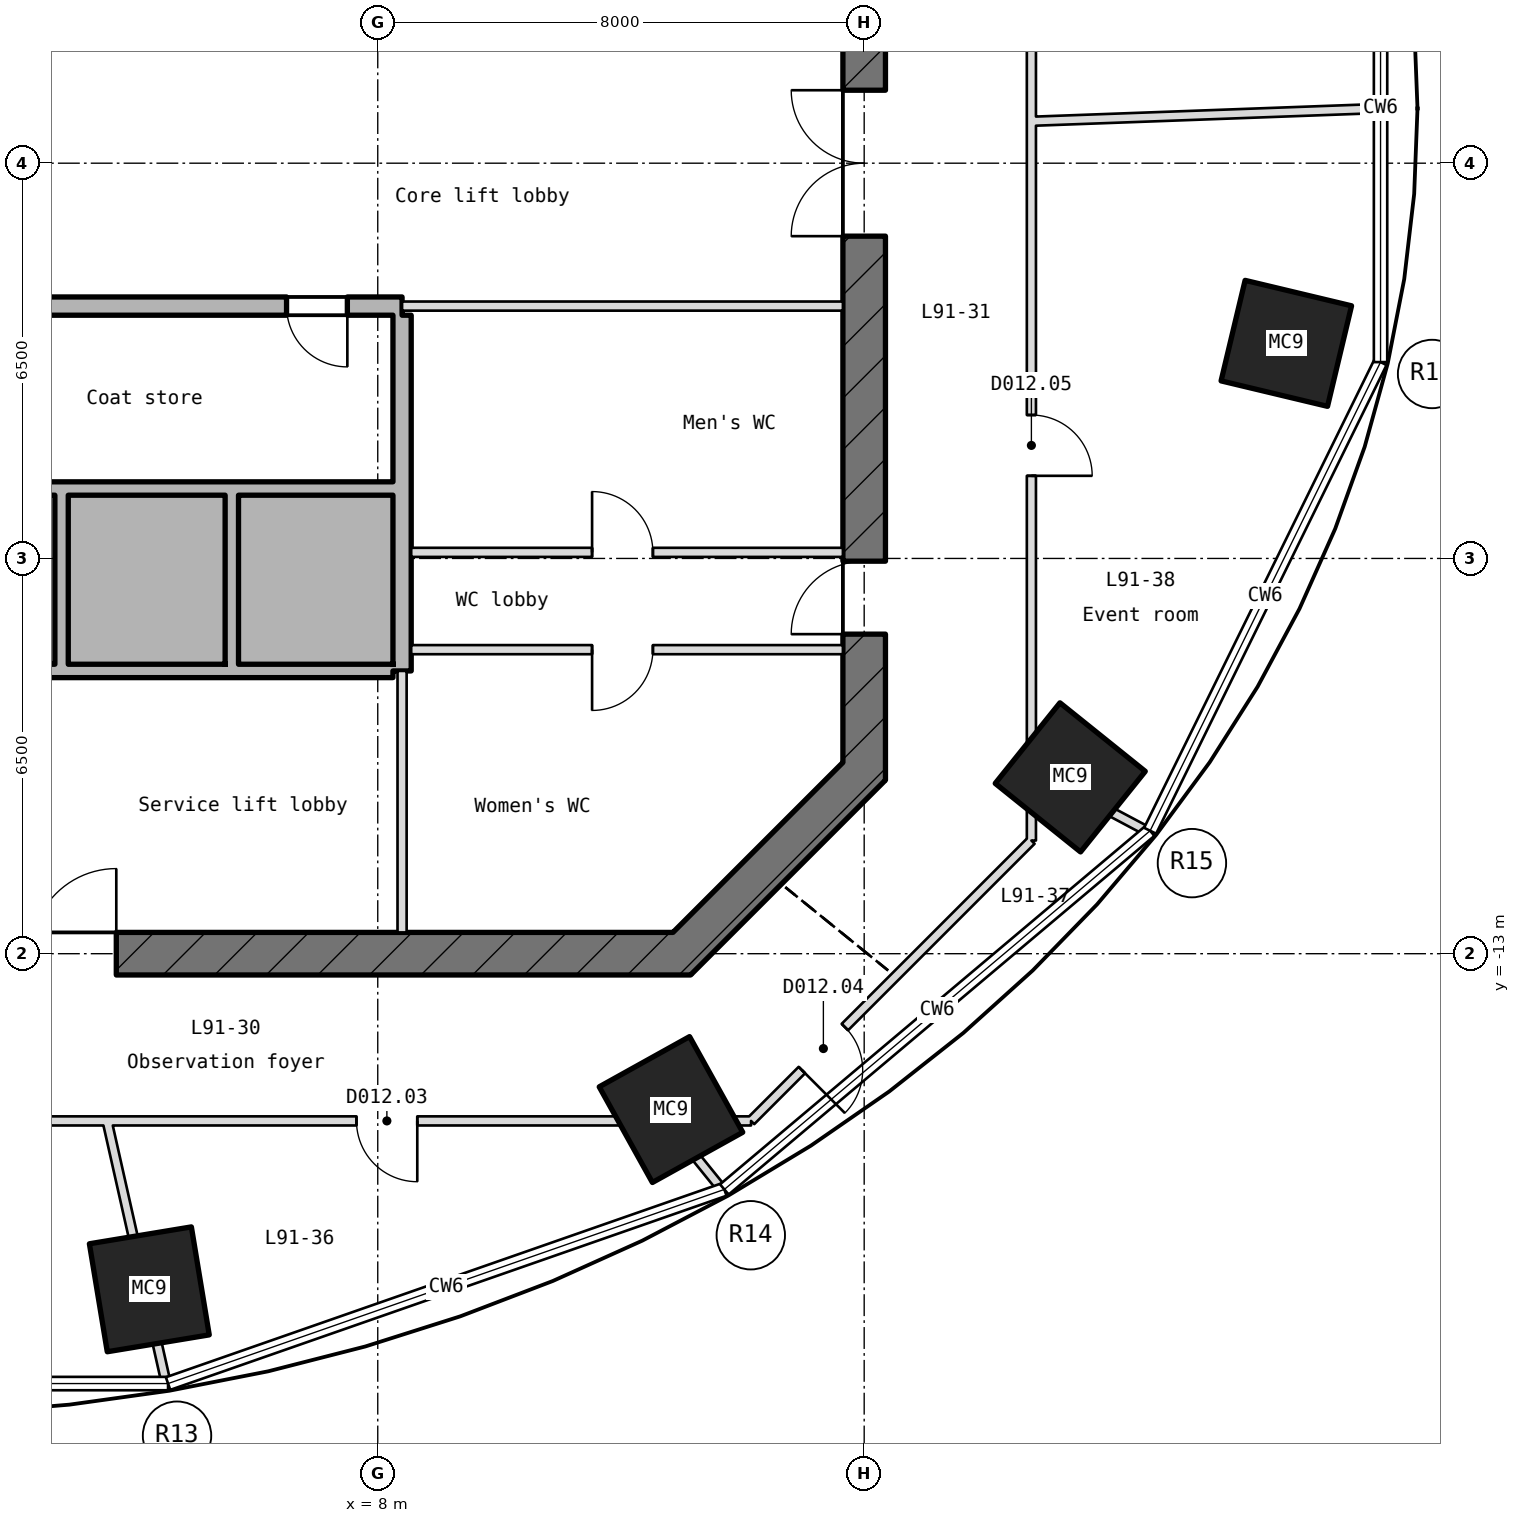
"""IFC4 building model, lengths in metres.
Left out: names, types, materials, properties, quantities, classifications, styles, units other than length and angle.
Written with IfcOpenShell. Run it as: python <this file> out.ifc"""

import sys

from ifc_helpers import new_model, si_unit, direction, frame, frame_2d, origin, origin_2d, place, context, subcontext, project, spatial, rectangle, hollow_rectangle, extrude, element, fill, save


model = new_model("IFC4")
c1 = context("Model", 3, precision=1e-05, world=origin(), true_north=direction((0.0, 1.0)))
c2 = subcontext(c1, "Body", "Model", "MODEL_VIEW")
j1 = project(units=[si_unit("LENGTHUNIT", "METRE"), si_unit("PLANEANGLEUNIT", "RADIAN")], contexts=[c1])
p1 = place(None, origin())
s1 = spatial("IfcSite", under=j1, at=p1, CompositionType="ELEMENT")
p2 = place(p1, origin())
s2 = spatial("IfcBuilding", under=s1, at=p2, CompositionType="ELEMENT")
p3 = place(p2, frame((0.0, 0.0, 401.95)))
s3 = spatial("IfcBuildingStorey", under=s2, at=p3, CompositionType="ELEMENT", Elevation=401.95)
for number, where, z_axis, x_axis in (
    (1, (4.243, -18.52, -0.25), (0.0, 0.0, 1.0), (-0.987, -0.163, 0.0)),
    (2, (12.823, -15.563, -0.25), (0.0, 0.0, 1.0), (-0.874, -0.486, 0.0)),
    (3, (19.389, -10.1, -0.25), (0.0, 0.0, 1.0), (-0.626, -0.78, 0.0)),
    (4, (22.943, -2.963, -0.25), (0.0, 0.0, 1.0), (-0.233, -0.973, 0.0)),
):
    element("IfcColumn", number, at=place(p3, frame(where, z_axis=z_axis, x_axis=x_axis)), inside=s3, PredefinedType="COLUMN", context=c2, shape_type="SweptSolid", body=[
        extrude(hollow_rectangle(XDim=1.7, YDim=1.8, WallThickness=0.05, at=origin_2d()), origin(), (0.0, 0.0, 1.0), 5.55),
    ])
p4 = place(p3, frame((12.897, -13.103, -0.25), z_axis=(0.0, 0.0, 1.0), x_axis=(0.707106781187, 0.707106781187, 0.0)))
e5 = element("IfcWall", 5, at=p4, inside=s3, PredefinedType="SHEAR", context=c2, shape_type="SweptSolid", body=[
    extrude(rectangle(XDim=4.533, YDim=0.7, at=frame_2d((2.266, 0.0))), origin(), (0.0, 0.0, 1.0), 5.55),
])
p5 = place(p3, frame((16.0, -10.145, -0.25), z_axis=(0.0, 0.0, 1.0), x_axis=(0.0, 1.0, 0.0)))
e6 = element("IfcWall", 6, at=p5, inside=s3, PredefinedType="SHEAR", context=c2, shape_type="SweptSolid", body=[
    extrude(rectangle(XDim=20.29, YDim=0.7, at=frame_2d((10.145, 0.0))), origin(), (0.0, 0.0, 1.0), 5.55),
])
p6 = place(p5, frame((8.945, 0.0, 0.25)))
e7 = element("IfcOpeningElement", 7, at=p6, cuts=e6, PredefinedType="OPENING", context=c2, shape_type="SweptSolid", body=[
    extrude(rectangle(XDim=2.4, YDim=2.1, at=frame_2d((1.2, 1.05))), frame((0.0, 0.36, 0.0), z_axis=(0.0, -1.0, 0.0), x_axis=(1.0, 0.0, 0.0)), (0.0, 0.0, 1.0), 0.72),
])
p7 = place(p5, frame((13.545, 0.0, 0.25)))
e8 = element("IfcOpeningElement", 8, at=p7, cuts=e6, PredefinedType="OPENING", context=c2, shape_type="SweptSolid", body=[
    extrude(rectangle(XDim=1.2, YDim=2.1, at=frame_2d((0.6, 1.05))), frame((0.0, 0.36, 0.0), z_axis=(0.0, -1.0, 0.0), x_axis=(1.0, 0.0, 0.0)), (0.0, 0.0, 1.0), 0.72),
])
p8 = place(p5, frame((2.4, 0.0, 0.25)))
e9 = element("IfcOpeningElement", 9, at=p8, cuts=e6, PredefinedType="OPENING", context=c2, shape_type="SweptSolid", body=[
    extrude(rectangle(XDim=1.2, YDim=2.1, at=frame_2d((0.6, 1.05))), frame((0.0, 0.36, 0.0), z_axis=(0.0, -1.0, 0.0), x_axis=(1.0, 0.0, 0.0)), (0.0, 0.0, 1.0), 0.72),
])
p9 = place(p3, frame((-13.145, -13.0, -0.25), z_axis=(0.0, 0.0, 1.0), x_axis=(1.0, 0.0, 0.0)))
e10 = element("IfcWall", 10, at=p9, inside=s3, PredefinedType="SHEAR", context=c2, shape_type="SweptSolid", body=[
    extrude(rectangle(XDim=26.29, YDim=0.7, at=frame_2d((13.145, 0.0))), origin(), (0.0, 0.0, 1.0), 5.55),
])
p10 = place(p9, frame((2.845, 0.0, 0.25)))
e11 = element("IfcOpeningElement", 11, at=p10, cuts=e10, PredefinedType="OPENING", context=c2, shape_type="SweptSolid", body=[
    extrude(rectangle(XDim=1.2, YDim=2.1, at=frame_2d((0.6, 1.05))), frame((0.0, 0.36, 0.0), z_axis=(0.0, -1.0, 0.0), x_axis=(1.0, 0.0, 0.0)), (0.0, 0.0, 1.0), 0.72),
])
p11 = place(p9, frame((6.845, 0.0, 0.25)))
e12 = element("IfcOpeningElement", 12, at=p11, cuts=e10, PredefinedType="OPENING", context=c2, shape_type="SweptSolid", body=[
    extrude(rectangle(XDim=1.4, YDim=2.1, at=frame_2d((0.7, 1.05))), frame((0.0, 0.36, 0.0), z_axis=(0.0, -1.0, 0.0), x_axis=(1.0, 0.0, 0.0)), (0.0, 0.0, 1.0), 0.72),
])
p12 = place(p9, frame((15.445, 0.0, 0.25)))
e13 = element("IfcOpeningElement", 13, at=p12, cuts=e10, PredefinedType="OPENING", context=c2, shape_type="SweptSolid", body=[
    extrude(rectangle(XDim=1.4, YDim=2.1, at=frame_2d((0.7, 1.05))), frame((0.0, 0.36, 0.0), z_axis=(0.0, -1.0, 0.0), x_axis=(1.0, 0.0, 0.0)), (0.0, 0.0, 1.0), 0.72),
])
p13 = place(p3, frame((-2.69, -8.35, 0.0), z_axis=(0.0, 0.0, 1.0), x_axis=(1.0, 0.0, 0.0)))
e14 = element("IfcWall", 14, at=p13, inside=s3, PredefinedType="STANDARD", context=c2, shape_type="SweptSolid", body=[
    extrude(rectangle(XDim=10.94, YDim=0.22, at=frame_2d((5.47, 0.0))), origin(), (0.0, 0.0, 1.0), 5.3),
])
p14 = place(p13, frame((0.74, 0.0, 0.0)))
e15 = element("IfcOpeningElement", 15, at=p14, cuts=e14, PredefinedType="OPENING", context=c2, shape_type="SweptSolid", body=[
    extrude(rectangle(XDim=1.1, YDim=2.1, at=frame_2d((0.55, 1.05))), frame((0.0, 0.12, 0.0), z_axis=(0.0, -1.0, 0.0), x_axis=(1.0, 0.0, 0.0)), (0.0, 0.0, 1.0), 0.24),
])
p15 = place(p13, frame((3.54, 0.0, 0.0)))
e16 = element("IfcOpeningElement", 16, at=p15, cuts=e14, PredefinedType="OPENING", context=c2, shape_type="SweptSolid", body=[
    extrude(rectangle(XDim=1.1, YDim=2.1, at=frame_2d((0.55, 1.05))), frame((0.0, 0.12, 0.0), z_axis=(0.0, -1.0, 0.0), x_axis=(1.0, 0.0, 0.0)), (0.0, 0.0, 1.0), 0.24),
])
p16 = place(p3, frame((8.55, -8.0, 0.0), z_axis=(0.0, 0.0, 1.0), x_axis=(1.0, 0.0, 0.0)))
e17 = element("IfcWall", 17, at=p16, inside=s3, PredefinedType="PARTITIONING", context=c2, shape_type="SweptSolid", body=[
    extrude(rectangle(XDim=7.1, YDim=0.15, at=frame_2d((3.55, 0.0))), origin(), (0.0, 0.0, 1.0), 5.3),
])
p17 = place(p16, frame((2.975, 0.0, 0.0)))
e18 = element("IfcOpeningElement", 18, at=p17, cuts=e17, PredefinedType="OPENING", context=c2, shape_type="SweptSolid", body=[
    extrude(rectangle(XDim=1.0, YDim=2.1, at=frame_2d((0.5, 1.05))), frame((0.0, 0.085, 0.0), z_axis=(0.0, -1.0, 0.0), x_axis=(1.0, 0.0, 0.0)), (0.0, 0.0, 1.0), 0.17),
])
p18 = place(p3, frame((8.55, -6.4, 0.0), z_axis=(0.0, 0.0, 1.0), x_axis=(1.0, 0.0, 0.0)))
e19 = element("IfcWall", 19, at=p18, inside=s3, PredefinedType="PARTITIONING", context=c2, shape_type="SweptSolid", body=[
    extrude(rectangle(XDim=7.1, YDim=0.15, at=frame_2d((3.55, 0.0))), origin(), (0.0, 0.0, 1.0), 5.3),
])
p19 = place(p18, frame((2.975, 0.0, 0.0)))
e20 = element("IfcOpeningElement", 20, at=p19, cuts=e19, PredefinedType="OPENING", context=c2, shape_type="SweptSolid", body=[
    extrude(rectangle(XDim=1.0, YDim=2.1, at=frame_2d((0.5, 1.05))), frame((0.0, 0.085, 0.0), z_axis=(0.0, -1.0, 0.0), x_axis=(1.0, 0.0, 0.0)), (0.0, 0.0, 1.0), 0.17),
])
p20 = place(p3, frame((-8.25, -5.35, 0.0), z_axis=(0.0, 0.0, 1.0), x_axis=(1.0, 0.0, 0.0)))
e21 = element("IfcWall", 21, at=p20, inside=s3, PredefinedType="STANDARD", context=c2, shape_type="SweptSolid", body=[
    extrude(rectangle(XDim=16.5, YDim=0.22, at=frame_2d((8.25, 0.0))), origin(), (0.0, 0.0, 1.0), 5.3),
])
p21 = place(p3, frame((-8.4, -2.35, -0.25), z_axis=(0.0, 0.0, 1.0), x_axis=(1.0, 0.0, 0.0)))
e22 = element("IfcWall", 22, at=p21, inside=s3, PredefinedType="SHEAR", context=c2, shape_type="SweptSolid", body=[
    extrude(rectangle(XDim=16.8, YDim=0.3, at=frame_2d((8.4, 0.0))), origin(), (0.0, 0.0, 1.0), 5.55),
])
p22 = place(p21, frame((0.9, 0.0, 0.25)))
e23 = element("IfcOpeningElement", 23, at=p22, cuts=e22, PredefinedType="OPENING", context=c2, shape_type="SweptSolid", body=[
    extrude(rectangle(XDim=1.0, YDim=2.1, at=frame_2d((0.5, 1.05))), frame((0.0, 0.16, 0.0), z_axis=(0.0, -1.0, 0.0), x_axis=(1.0, 0.0, 0.0)), (0.0, 0.0, 1.0), 0.32),
])
p23 = place(p21, frame((14.9, 0.0, 0.25)))
e24 = element("IfcOpeningElement", 24, at=p23, cuts=e22, PredefinedType="OPENING", context=c2, shape_type="SweptSolid", body=[
    extrude(rectangle(XDim=1.0, YDim=2.1, at=frame_2d((0.5, 1.05))), frame((0.0, 0.16, 0.0), z_axis=(0.0, -1.0, 0.0), x_axis=(1.0, 0.0, 0.0)), (0.0, 0.0, 1.0), 0.32),
])
p24 = place(p3, frame((8.4, -2.35, 0.0), z_axis=(0.0, 0.0, 1.0), x_axis=(1.0, 0.0, 0.0)))
e25 = element("IfcWall", 25, at=p24, inside=s3, PredefinedType="PARTITIONING", context=c2, shape_type="SweptSolid", body=[
    extrude(rectangle(XDim=7.25, YDim=0.15, at=frame_2d((3.625, 0.0))), origin(), (0.0, 0.0, 1.0), 5.3),
])
for number, where, z_axis, x_axis in (
    (26, (2.8, -8.24, 0.0), (0.0, 0.0, 1.0), (0.0, 1.0, 0.0)),
    (27, (5.6, -8.24, 0.0), (0.0, 0.0, 1.0), (0.0, 1.0, 0.0)),
):
    element("IfcWall", number, at=place(p3, frame(where, z_axis=z_axis, x_axis=x_axis)), inside=s3, PredefinedType="STANDARD", context=c2, shape_type="SweptSolid", body=[
        extrude(rectangle(XDim=2.78, YDim=0.22, at=frame_2d((1.39, 0.0))), origin(), (0.0, 0.0, 1.0), 5.3),
    ])
p25 = place(p3, frame((8.4, -12.65, 0.0), z_axis=(0.0, 0.0, 1.0), x_axis=(0.0, 1.0, 0.0)))
e28 = element("IfcWall", 28, at=p25, inside=s3, PredefinedType="PARTITIONING", context=c2, shape_type="SweptSolid", body=[
    extrude(rectangle(XDim=4.3, YDim=0.15, at=frame_2d((2.15, 0.0))), origin(), (0.0, 0.0, 1.0), 5.3),
])
p26 = place(p3, frame((8.4, -8.35, -0.25), z_axis=(0.0, 0.0, 1.0), x_axis=(0.0, 1.0, 0.0)))
e29 = element("IfcWall", 29, at=p26, inside=s3, PredefinedType="SHEAR", context=c2, shape_type="SweptSolid", body=[
    extrude(rectangle(XDim=5.85, YDim=0.3, at=frame_2d((2.925, 0.0))), origin(), (0.0, 0.0, 1.0), 5.55),
])
p27 = place(p3, frame((-14.139, -15.75, 0.0), z_axis=(0.0, 0.0, 1.0), x_axis=(1.0, 0.0, 0.0)))
e30 = element("IfcWall", 30, at=p27, inside=s3, PredefinedType="PARTITIONING", context=c2, shape_type="SweptSolid", body=[
    extrude(rectangle(XDim=28.278, YDim=0.15, at=frame_2d((14.139, 0.0))), origin(), (0.0, 0.0, 1.0), 5.3),
])
p28 = place(p27, frame((2.338, 0.0, 0.0)))
e31 = element("IfcOpeningElement", 31, at=p28, cuts=e30, PredefinedType="OPENING", context=c2, shape_type="SweptSolid", body=[
    extrude(rectangle(XDim=1.0, YDim=2.1, at=frame_2d((0.5, 1.05))), frame((0.0, 0.085, 0.0), z_axis=(0.0, -1.0, 0.0), x_axis=(1.0, 0.0, 0.0)), (0.0, 0.0, 1.0), 0.17),
])
p29 = place(p27, frame((9.251, 0.0, 0.0)))
e32 = element("IfcOpeningElement", 32, at=p29, cuts=e30, PredefinedType="OPENING", context=c2, shape_type="SweptSolid", body=[
    extrude(rectangle(XDim=1.0, YDim=2.1, at=frame_2d((0.5, 1.05))), frame((0.0, 0.085, 0.0), z_axis=(0.0, -1.0, 0.0), x_axis=(1.0, 0.0, 0.0)), (0.0, 0.0, 1.0), 0.17),
])
p30 = place(p27, frame((15.306, 0.0, 0.0)))
e33 = element("IfcOpeningElement", 33, at=p30, cuts=e30, PredefinedType="OPENING", context=c2, shape_type="SweptSolid", body=[
    extrude(rectangle(XDim=0.9, YDim=2.1, at=frame_2d((0.45, 1.05))), frame((0.0, 0.085, 0.0), z_axis=(0.0, -1.0, 0.0), x_axis=(1.0, 0.0, 0.0)), (0.0, 0.0, 1.0), 0.17),
])
p31 = place(p27, frame((21.789, 0.0, 0.0)))
e34 = element("IfcOpeningElement", 34, at=p31, cuts=e30, PredefinedType="OPENING", context=c2, shape_type="SweptSolid", body=[
    extrude(rectangle(XDim=1.0, YDim=2.1, at=frame_2d((0.5, 1.05))), frame((0.0, 0.085, 0.0), z_axis=(0.0, -1.0, 0.0), x_axis=(1.0, 0.0, 0.0)), (0.0, 0.0, 1.0), 0.17),
])
p32 = place(p3, frame((18.75, 0.689, 0.0), z_axis=(0.0, 0.0, 1.0), x_axis=(0.999324436598, 0.036751468252, 0.0)))
e35 = element("IfcWall", 35, at=p32, inside=s3, PredefinedType="PARTITIONING", context=c2, shape_type="SweptSolid", body=[
    extrude(rectangle(XDim=5.726, YDim=0.15, at=frame_2d((2.863, 0.0))), origin(), (0.0, 0.0, 1.0), 5.3),
])
p33 = place(p3, frame((14.139, -15.75, 0.0), z_axis=(0.0, 0.0, 1.0), x_axis=(0.707106781187, 0.707106781187, 0.0)))
e36 = element("IfcWall", 36, at=p33, inside=s3, PredefinedType="PARTITIONING", context=c2, shape_type="SweptSolid", body=[
    extrude(rectangle(XDim=6.521, YDim=0.15, at=frame_2d((3.26, 0.0))), origin(), (0.0, 0.0, 1.0), 5.3),
])
p34 = place(p33, frame((1.183, 0.0, 0.0)))
e37 = element("IfcOpeningElement", 37, at=p34, cuts=e36, PredefinedType="OPENING", context=c2, shape_type="SweptSolid", body=[
    extrude(rectangle(XDim=1.0, YDim=2.1, at=frame_2d((0.5, 1.05))), frame((0.0, 0.085, 0.0), z_axis=(0.0, -1.0, 0.0), x_axis=(1.0, 0.0, 0.0)), (0.0, 0.0, 1.0), 0.17),
])
p35 = place(p3, frame((18.75, -11.139, 0.0), z_axis=(0.0, 0.0, 1.0), x_axis=(0.0, 1.0, 0.0)))
e38 = element("IfcWall", 38, at=p35, inside=s3, PredefinedType="PARTITIONING", context=c2, shape_type="SweptSolid", body=[
    extrude(rectangle(XDim=22.278, YDim=0.15, at=frame_2d((11.139, 0.0))), origin(), (0.0, 0.0, 1.0), 5.3),
])
p36 = place(p35, frame((5.998, 0.0, 0.0)))
e39 = element("IfcOpeningElement", 39, at=p36, cuts=e38, PredefinedType="OPENING", context=c2, shape_type="SweptSolid", body=[
    extrude(rectangle(XDim=1.0, YDim=2.1, at=frame_2d((0.5, 1.05))), frame((0.0, 0.085, 0.0), z_axis=(0.0, -1.0, 0.0), x_axis=(1.0, 0.0, 0.0)), (0.0, 0.0, 1.0), 0.17),
])
p37 = place(p35, frame((16.553, 0.0, 0.0)))
e40 = element("IfcOpeningElement", 40, at=p37, cuts=e38, PredefinedType="OPENING", context=c2, shape_type="SweptSolid", body=[
    extrude(rectangle(XDim=1.0, YDim=2.1, at=frame_2d((0.5, 1.05))), frame((0.0, 0.085, 0.0), z_axis=(0.0, -1.0, 0.0), x_axis=(1.0, 0.0, 0.0)), (0.0, 0.0, 1.0), 0.17),
])
p38 = place(p3, frame((4.517, -20.049, 0.0), z_axis=(0.0, 0.0, 1.0), x_axis=(-0.219784451293, 0.975548458545, 0.0)))
e41 = element("IfcWall", 41, at=p38, inside=s3, PredefinedType="PARTITIONING", context=c2, shape_type="SweptSolid", body=[
    extrude(rectangle(XDim=2.454, YDim=0.15, at=frame_2d((1.227, 0.0))), origin(), (0.0, 0.0, 1.0), 5.3),
])
p39 = place(p3, frame((3.978, -17.656, 0.0), z_axis=(0.0, 0.0, 1.0), x_axis=(-0.219735255916, 0.975559540627, 0.0)))
e42 = element("IfcWall", 42, at=p39, inside=s3, PredefinedType="PARTITIONING", context=c2, shape_type="SweptSolid", body=[
    extrude(rectangle(XDim=1.953, YDim=0.15, at=frame_2d((0.977, 0.0))), origin(), (0.0, 0.0, 1.0), 4.459),
])
p40 = place(p3, frame((13.659, -16.87, 0.0), z_axis=(0.0, 0.0, 1.0), x_axis=(-0.629290809625, 0.77716991509, 0.0)))
e43 = element("IfcWall", 43, at=p40, inside=s3, PredefinedType="PARTITIONING", context=c2, shape_type="SweptSolid", body=[
    extrude(rectangle(XDim=1.441, YDim=0.15, at=frame_2d((0.721, 0.0))), origin(), (0.0, 0.0, 1.0), 5.3),
])
p41 = place(p3, frame((20.661, -10.987, 0.0), z_axis=(0.0, 0.0, 1.0), x_axis=(-0.882908214284, 0.469545615621, 0.0)))
e44 = element("IfcWall", 44, at=p41, inside=s3, PredefinedType="PARTITIONING", context=c2, shape_type="SweptSolid", body=[
    extrude(rectangle(XDim=2.164, YDim=0.15, at=frame_2d((1.082, 0.0))), origin(), (0.0, 0.0, 1.0), 5.3),
])
p42 = place(p6, origin())
e45 = element("IfcDoor", 45, at=p42, inside=s3, OperationType="DOUBLE_DOOR_SINGLE_SWING", PredefinedType="DOOR", context=c2, shape_type="SweptSolid", body=[
    extrude(rectangle(XDim=2.4, YDim=2.1, at=frame_2d((1.2, 1.05))), frame((0.0, 0.025, 0.0), z_axis=(0.0, -1.0, 0.0), x_axis=(1.0, 0.0, 0.0)), (0.0, 0.0, 1.0), 0.05),
])
fill(e7, e45)
p43 = place(p12, origin())
e46 = element("IfcDoor", 46, at=p43, inside=s3, OperationType="SINGLE_SWING_RIGHT", PredefinedType="DOOR", context=c2, shape_type="SweptSolid", body=[
    extrude(rectangle(XDim=1.4, YDim=2.1, at=frame_2d((0.7, 1.05))), frame((0.0, 0.025, 0.0), z_axis=(0.0, -1.0, 0.0), x_axis=(1.0, 0.0, 0.0)), (0.0, 0.0, 1.0), 0.05),
])
fill(e13, e46)
p44 = place(p23, frame((1.0, 0.0, 0.0), z_axis=(0.0, 0.0, 1.0), x_axis=(-1.0, 0.0, 0.0)))
e47 = element("IfcDoor", 47, at=p44, inside=s3, OperationType="SINGLE_SWING_LEFT", PredefinedType="DOOR", context=c2, shape_type="SweptSolid", body=[
    extrude(rectangle(XDim=1.0, YDim=2.1, at=frame_2d((0.5, 1.05))), frame((0.0, 0.025, 0.0), z_axis=(0.0, -1.0, 0.0), x_axis=(1.0, 0.0, 0.0)), (0.0, 0.0, 1.0), 0.05),
])
fill(e24, e47)
p45 = place(p19, origin())
e48 = element("IfcDoor", 48, at=p45, inside=s3, OperationType="SINGLE_SWING_RIGHT", PredefinedType="DOOR", context=c2, shape_type="SweptSolid", body=[
    extrude(rectangle(XDim=1.0, YDim=2.1, at=frame_2d((0.5, 1.05))), frame((0.0, 0.025, 0.0), z_axis=(0.0, -1.0, 0.0), x_axis=(1.0, 0.0, 0.0)), (0.0, 0.0, 1.0), 0.05),
])
fill(e20, e48)
p46 = place(p8, origin())
e49 = element("IfcDoor", 49, at=p46, inside=s3, OperationType="SINGLE_SWING_RIGHT", PredefinedType="DOOR", context=c2, shape_type="SweptSolid", body=[
    extrude(rectangle(XDim=1.2, YDim=2.1, at=frame_2d((0.6, 1.05))), frame((0.0, 0.025, 0.0), z_axis=(0.0, -1.0, 0.0), x_axis=(1.0, 0.0, 0.0)), (0.0, 0.0, 1.0), 0.05),
])
fill(e9, e49)
p47 = place(p17, frame((1.0, 0.0, 0.0), z_axis=(0.0, 0.0, 1.0), x_axis=(-1.0, 0.0, 0.0)))
e50 = element("IfcDoor", 50, at=p47, inside=s3, OperationType="SINGLE_SWING_LEFT", PredefinedType="DOOR", context=c2, shape_type="SweptSolid", body=[
    extrude(rectangle(XDim=1.0, YDim=2.1, at=frame_2d((0.5, 1.05))), frame((0.0, 0.025, 0.0), z_axis=(0.0, -1.0, 0.0), x_axis=(1.0, 0.0, 0.0)), (0.0, 0.0, 1.0), 0.05),
])
fill(e18, e50)
p48 = place(p31, frame((1.0, 0.0, 0.0), z_axis=(0.0, 0.0, 1.0), x_axis=(-1.0, 0.0, 0.0)))
e51 = element("IfcDoor", 51, at=p48, inside=s3, OperationType="SINGLE_SWING_LEFT", PredefinedType="DOOR", context=c2, shape_type="SweptSolid", body=[
    extrude(rectangle(XDim=1.0, YDim=2.1, at=frame_2d((0.5, 1.05))), frame((0.0, 0.025, 0.0), z_axis=(0.0, -1.0, 0.0), x_axis=(1.0, 0.0, 0.0)), (0.0, 0.0, 1.0), 0.05),
])
fill(e34, e51)
p49 = place(p34, frame((1.0, 0.0, 0.0), z_axis=(0.0, 0.0, 1.0), x_axis=(-1.0, 0.0, 0.0)))
e52 = element("IfcDoor", 52, at=p49, inside=s3, OperationType="SINGLE_SWING_LEFT", PredefinedType="DOOR", context=c2, shape_type="SweptSolid", body=[
    extrude(rectangle(XDim=1.0, YDim=2.1, at=frame_2d((0.5, 1.05))), frame((0.0, 0.025, 0.0), z_axis=(0.0, -1.0, 0.0), x_axis=(1.0, 0.0, 0.0)), (0.0, 0.0, 1.0), 0.05),
])
fill(e37, e52)
p50 = place(p36, frame((1.0, 0.0, 0.0), z_axis=(0.0, 0.0, 1.0), x_axis=(-1.0, 0.0, 0.0)))
e53 = element("IfcDoor", 53, at=p50, inside=s3, OperationType="SINGLE_SWING_LEFT", PredefinedType="DOOR", context=c2, shape_type="SweptSolid", body=[
    extrude(rectangle(XDim=1.0, YDim=2.1, at=frame_2d((0.5, 1.05))), frame((0.0, 0.025, 0.0), z_axis=(0.0, -1.0, 0.0), x_axis=(1.0, 0.0, 0.0)), (0.0, 0.0, 1.0), 0.05),
])
fill(e39, e53)
save(model, sys.argv[1])
